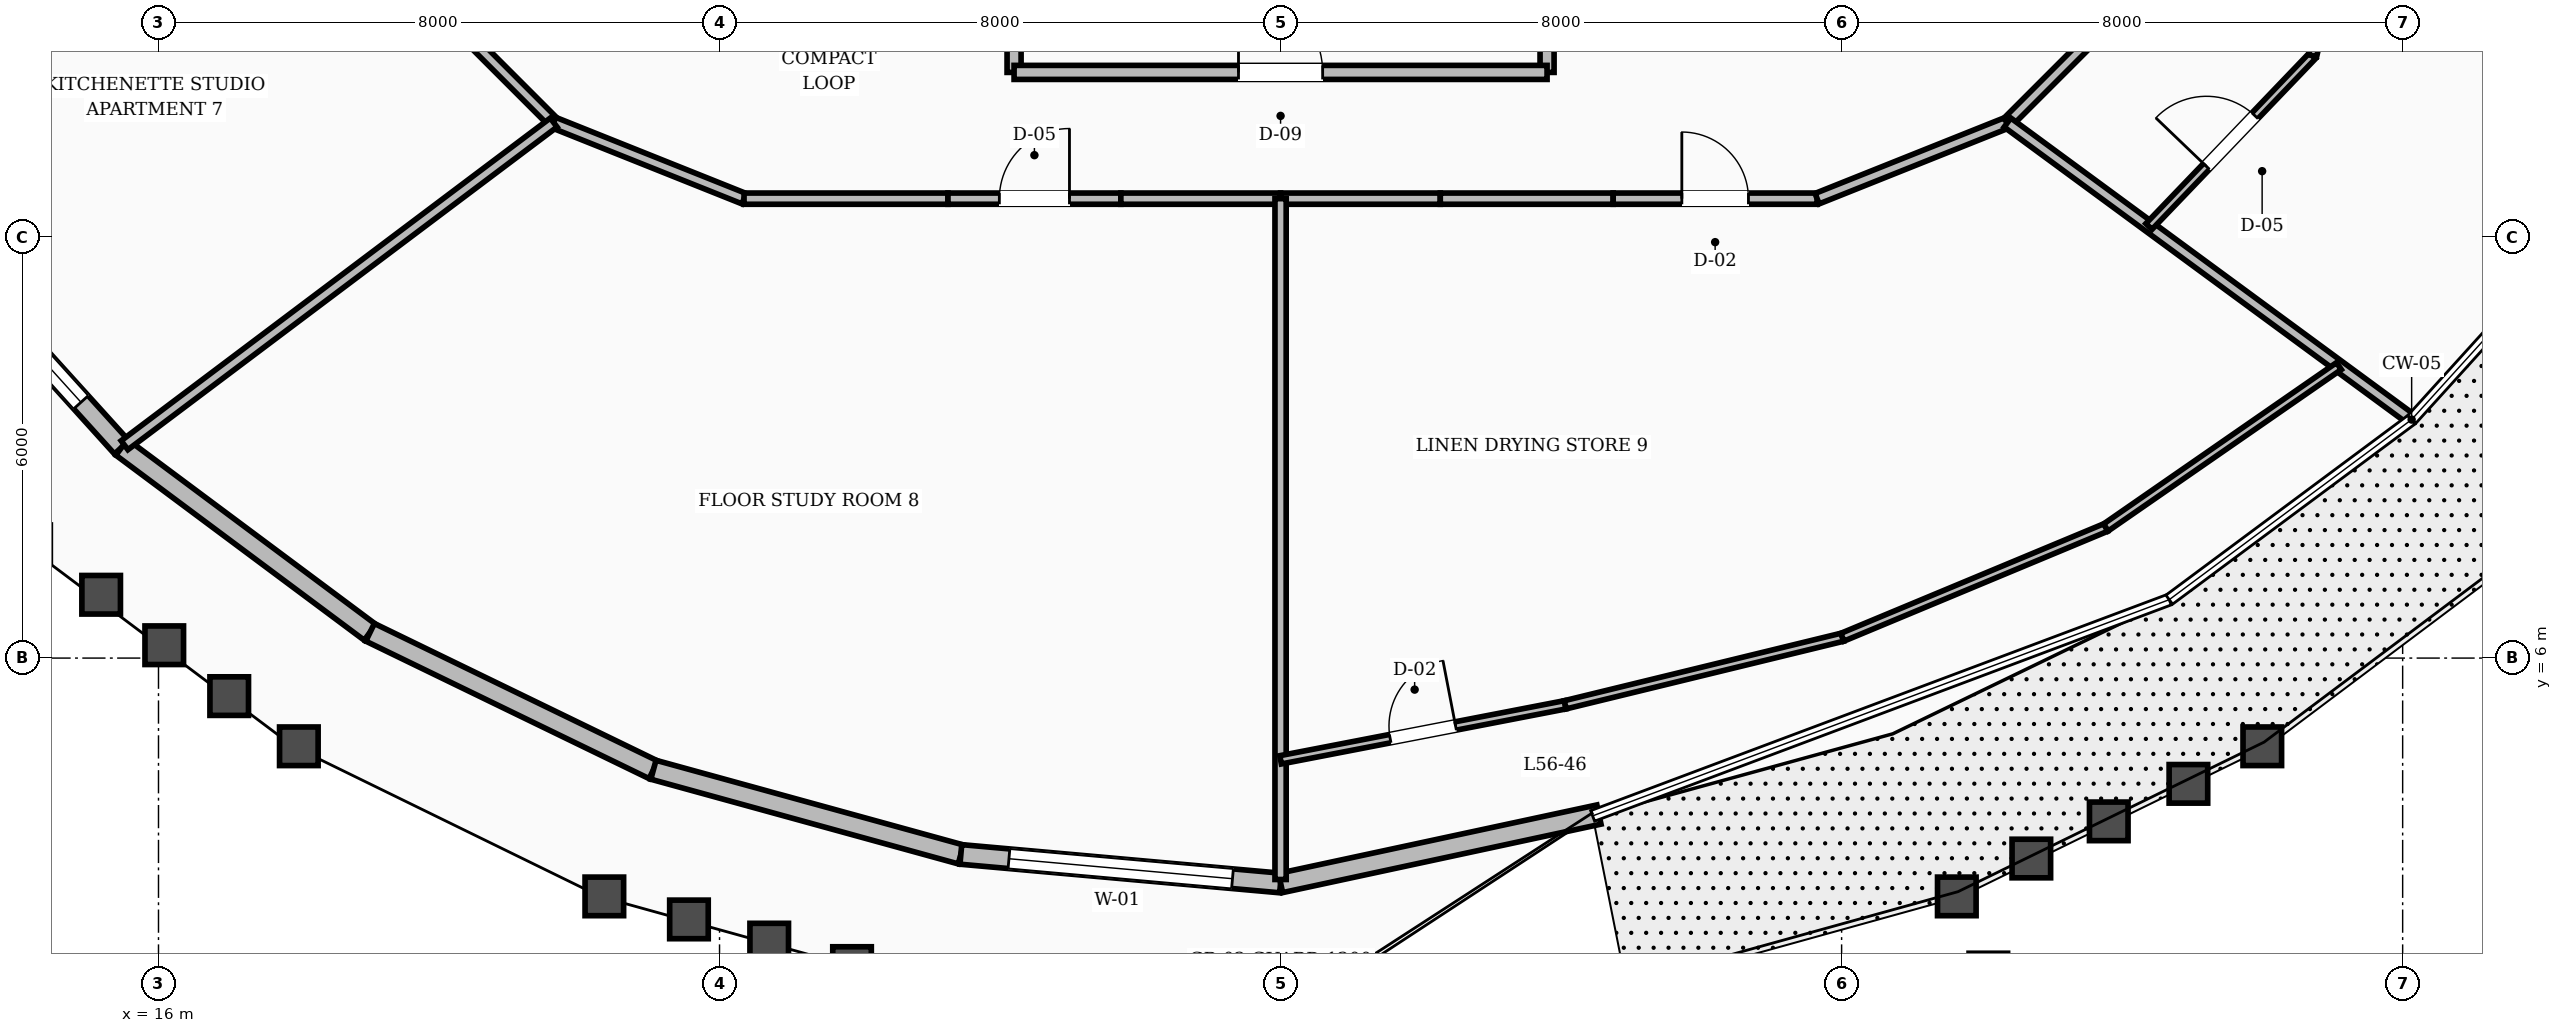
"""IFC4 building model, lengths in metres.
Left out: names, types, materials, properties, quantities, classifications, styles, units other than length and angle.
Written with IfcOpenShell. Run it as: python <this file> out.ifc"""

import sys

from ifc_helpers import new_model, si_unit, direction, frame, frame_2d, origin, place, context, subcontext, project, spatial, rectangle, extrude, element, fill, save


model = new_model("IFC4")
c1 = context("Model", 3, precision=1e-05, world=origin(), true_north=direction((0.0, 1.0)))
c2 = subcontext(c1, "Body", "Model", "MODEL_VIEW")
j1 = project(units=[si_unit("LENGTHUNIT", "METRE"), si_unit("PLANEANGLEUNIT", "RADIAN")], contexts=[c1])
p1 = place(None, origin())
s1 = spatial("IfcSite", under=j1, at=p1, CompositionType="ELEMENT")
p2 = place(p1, origin())
s2 = spatial("IfcBuilding", under=s1, at=p2, CompositionType="ELEMENT")
p3 = place(p2, frame((0.0, 0.0, 218.4)))
s3 = spatial("IfcBuildingStorey", under=s2, at=p3, CompositionType="ELEMENT", Elevation=218.4)
p4 = place(p3, frame((12.57, 12.218, 0.0), z_axis=(0.0, 0.0, 1.0), x_axis=(0.670746586543, -0.741686602711, 0.0)))
e1 = element("IfcWall", 1, at=p4, inside=s3, PredefinedType="STANDARD", context=c2, shape_type="SweptSolid", body=[
    extrude(rectangle(XDim=4.333, YDim=0.28, at=frame_2d((2.167, 0.0))), origin(), (0.0, 0.0, 1.0), 2.88),
])
p5 = place(p4, frame((0.866, 0.0, 0.8)))
e2 = element("IfcOpeningElement", 2, at=p5, cuts=e1, PredefinedType="OPENING", context=c2, shape_type="SweptSolid", body=[
    extrude(rectangle(XDim=2.6, YDim=1.65, at=frame_2d((1.3, 0.825))), frame((0.0, 0.15, 0.0), z_axis=(0.0, -1.0, 0.0), x_axis=(1.0, 0.0, 0.0)), (0.0, 0.0, 1.0), 0.3),
])
p6 = place(p3, frame((15.476, 9.005, 0.0), z_axis=(0.0, 0.0, 1.0), x_axis=(0.802005914902, -0.597316090912, 0.0)))
e3 = element("IfcWall", 3, at=p6, inside=s3, PredefinedType="STANDARD", context=c2, shape_type="SweptSolid", body=[
    extrude(rectangle(XDim=4.416, YDim=0.28, at=frame_2d((2.208, 0.0))), origin(), (0.0, 0.0, 1.0), 2.88),
])
p7 = place(p3, frame((19.017, 6.367, 0.0), z_axis=(0.0, 0.0, 1.0), x_axis=(0.899755886265, -0.436393566785, 0.0)))
e4 = element("IfcWall", 4, at=p7, inside=s3, PredefinedType="STANDARD", context=c2, shape_type="SweptSolid", body=[
    extrude(rectangle(XDim=4.49, YDim=0.28, at=frame_2d((2.245, 0.0))), origin(), (0.0, 0.0, 1.0), 2.88),
])
p8 = place(p3, frame((23.057, 4.408, 0.0), z_axis=(0.0, 0.0, 1.0), x_axis=(0.964121606476, -0.265460972511, 0.0)))
e5 = element("IfcWall", 5, at=p8, inside=s3, PredefinedType="STANDARD", context=c2, shape_type="SweptSolid", body=[
    extrude(rectangle(XDim=4.547, YDim=0.28, at=frame_2d((2.273, 0.0))), origin(), (0.0, 0.0, 1.0), 2.88),
])
p9 = place(p3, frame((27.441, 3.201, 0.0), z_axis=(0.0, 0.0, 1.0), x_axis=(0.996029770712, -0.089020760807, 0.0)))
e6 = element("IfcWall", 6, at=p9, inside=s3, PredefinedType="STANDARD", context=c2, shape_type="SweptSolid", body=[
    extrude(rectangle(XDim=4.577, YDim=0.28, at=frame_2d((2.289, 0.0))), origin(), (0.0, 0.0, 1.0), 2.88),
])
p10 = place(p9, frame((0.689, 0.0, 0.8)))
e7 = element("IfcOpeningElement", 7, at=p10, cuts=e6, PredefinedType="OPENING", context=c2, shape_type="SweptSolid", body=[
    extrude(rectangle(XDim=3.2, YDim=1.65, at=frame_2d((1.6, 0.825))), frame((0.0, 0.15, 0.0), z_axis=(0.0, -1.0, 0.0), x_axis=(1.0, 0.0, 0.0)), (0.0, 0.0, 1.0), 0.3),
])
p11 = place(p3, frame((32.0, 2.793, 0.0), z_axis=(0.0, 0.0, 1.0), x_axis=(0.977658303717, 0.21020047853, 0.0)))
e8 = element("IfcWall", 8, at=p11, inside=s3, PredefinedType="STANDARD", context=c2, shape_type="SweptSolid", body=[
    extrude(rectangle(XDim=4.644, YDim=0.28, at=frame_2d((2.322, 0.0))), origin(), (0.0, 0.0, 1.0), 2.88),
])
for number, where, z_axis, x_axis in (
    (9, (28.2, 14.35, 0.0), (0.0, 0.0, 1.0), (0.0, 1.0, 0.0)),
    (10, (35.8, 14.35, 0.0), (0.0, 0.0, 1.0), (0.0, 1.0, 0.0)),
):
    element("IfcWall", number, at=place(p3, frame(where, z_axis=z_axis, x_axis=x_axis)), inside=s3, PredefinedType="SOLIDWALL", context=c2, shape_type="SweptSolid", body=[
        extrude(rectangle(XDim=2.2, YDim=0.2, at=frame_2d((1.1, 0.0))), origin(), (0.0, 0.0, 1.0), 2.87),
    ])
p12 = place(p3, frame((28.2, 14.35, 0.0), z_axis=(0.0, 0.0, 1.0), x_axis=(1.0, 0.0, 0.0)))
e11 = element("IfcWall", 11, at=p12, inside=s3, PredefinedType="SOLIDWALL", context=c2, shape_type="SweptSolid", body=[
    extrude(rectangle(XDim=7.6, YDim=0.2, at=frame_2d((3.8, 0.0))), origin(), (0.0, 0.0, 1.0), 2.87),
])
p13 = place(p12, frame((3.2, 0.0, 0.0)))
e12 = element("IfcOpeningElement", 12, at=p13, cuts=e11, PredefinedType="OPENING", context=c2, shape_type="SweptSolid", body=[
    extrude(rectangle(XDim=1.2, YDim=2.1, at=frame_2d((0.6, 1.05))), frame((0.0, 0.11, 0.0), z_axis=(0.0, -1.0, 0.0), x_axis=(1.0, 0.0, 0.0)), (0.0, 0.0, 1.0), 0.22),
])
p14 = place(p3, frame((19.573, 15.697, 0.0), z_axis=(0.0, 0.0, 1.0), x_axis=(0.707106781187, -0.707106781187, 0.0)))
e13 = element("IfcWall", 13, at=p14, inside=s3, PredefinedType="SOLIDWALL", context=c2, shape_type="SweptSolid", body=[
    extrude(rectangle(XDim=2.916, YDim=0.16, at=frame_2d((1.458, 0.0))), origin(), (0.0, 0.0, 1.0), 2.87),
])
p15 = place(p3, frame((21.635, 13.635, 0.0), z_axis=(0.0, 0.0, 1.0), x_axis=(0.92856882165, -0.371160266542, 0.0)))
e14 = element("IfcWall", 14, at=p15, inside=s3, PredefinedType="SOLIDWALL", context=c2, shape_type="SweptSolid", body=[
    extrude(rectangle(XDim=2.923, YDim=0.16, at=frame_2d((1.461, 0.0))), origin(), (0.0, 0.0, 1.0), 2.87),
])
p16 = place(p3, frame((24.349, 12.55, 0.0), z_axis=(0.0, 0.0, 1.0), x_axis=(1.0, 0.0, 0.0)))
e15 = element("IfcWall", 15, at=p16, inside=s3, PredefinedType="SOLIDWALL", context=c2, shape_type="SweptSolid", body=[
    extrude(rectangle(XDim=2.908, YDim=0.16, at=frame_2d((1.454, 0.0))), origin(), (0.0, 0.0, 1.0), 2.87),
])
p17 = place(p3, frame((27.257, 12.55, 0.0), z_axis=(0.0, 0.0, 1.0), x_axis=(1.0, 0.0, 0.0)))
e16 = element("IfcWall", 16, at=p17, inside=s3, PredefinedType="SOLIDWALL", context=c2, shape_type="SweptSolid", body=[
    extrude(rectangle(XDim=2.465, YDim=0.16, at=frame_2d((1.232, 0.0))), origin(), (0.0, 0.0, 1.0), 2.87),
])
p18 = place(p17, frame((0.733, 0.0, 0.0)))
e17 = element("IfcOpeningElement", 17, at=p18, cuts=e16, PredefinedType="OPENING", context=c2, shape_type="SweptSolid", body=[
    extrude(rectangle(XDim=1.0, YDim=2.1, at=frame_2d((0.5, 1.05))), frame((0.0, 0.09, 0.0), z_axis=(0.0, -1.0, 0.0), x_axis=(1.0, 0.0, 0.0)), (0.0, 0.0, 1.0), 0.18),
])
for number, where, z_axis, x_axis in (
    (18, (29.722, 12.55, 0.0), (0.0, 0.0, 1.0), (1.0, 0.0, 0.0)),
    (19, (32.0, 12.55, 0.0), (0.0, 0.0, 1.0), (1.0, 0.0, 0.0)),
):
    element("IfcWall", number, at=place(p3, frame(where, z_axis=z_axis, x_axis=x_axis)), inside=s3, PredefinedType="SOLIDWALL", context=c2, shape_type="SweptSolid", body=[
        extrude(rectangle(XDim=2.278, YDim=0.16, at=frame_2d((1.139, 0.0))), origin(), (0.0, 0.0, 1.0), 2.87),
    ])
p19 = place(p3, frame((34.278, 12.55, 0.0), z_axis=(0.0, 0.0, 1.0), x_axis=(1.0, 0.0, 0.0)))
e20 = element("IfcWall", 20, at=p19, inside=s3, PredefinedType="SOLIDWALL", context=c2, shape_type="SweptSolid", body=[
    extrude(rectangle(XDim=2.465, YDim=0.16, at=frame_2d((1.232, 0.0))), origin(), (0.0, 0.0, 1.0), 2.87),
])
p20 = place(p3, frame((36.743, 12.55, 0.0), z_axis=(0.0, 0.0, 1.0), x_axis=(1.0, 0.0, 0.0)))
e21 = element("IfcWall", 21, at=p20, inside=s3, PredefinedType="SOLIDWALL", context=c2, shape_type="SweptSolid", body=[
    extrude(rectangle(XDim=2.908, YDim=0.16, at=frame_2d((1.454, 0.0))), origin(), (0.0, 0.0, 1.0), 2.87),
])
p21 = place(p20, frame((0.979, 0.0, 0.0)))
e22 = element("IfcOpeningElement", 22, at=p21, cuts=e21, PredefinedType="OPENING", context=c2, shape_type="SweptSolid", body=[
    extrude(rectangle(XDim=0.95, YDim=2.1, at=frame_2d((0.475, 1.05))), frame((0.0, 0.09, 0.0), z_axis=(0.0, -1.0, 0.0), x_axis=(1.0, 0.0, 0.0)), (0.0, 0.0, 1.0), 0.18),
])
p22 = place(p3, frame((39.651, 12.55, 0.0), z_axis=(0.0, 0.0, 1.0), x_axis=(0.92856882165, 0.371160266542, 0.0)))
e23 = element("IfcWall", 23, at=p22, inside=s3, PredefinedType="SOLIDWALL", context=c2, shape_type="SweptSolid", body=[
    extrude(rectangle(XDim=2.923, YDim=0.16, at=frame_2d((1.461, 0.0))), origin(), (0.0, 0.0, 1.0), 2.87),
])
p23 = place(p3, frame((42.365, 13.635, 0.0), z_axis=(0.0, 0.0, 1.0), x_axis=(0.707106781187, 0.707106781187, 0.0)))
e24 = element("IfcWall", 24, at=p23, inside=s3, PredefinedType="SOLIDWALL", context=c2, shape_type="SweptSolid", body=[
    extrude(rectangle(XDim=2.916, YDim=0.16, at=frame_2d((1.458, 0.0))), origin(), (0.0, 0.0, 1.0), 2.87),
])
p24 = place(p3, frame((42.365, 13.635, 0.0), z_axis=(0.0, 0.0, 1.0), x_axis=(0.805864739579, -0.592099671933, 0.0)))
e25 = element("IfcWall", 25, at=p24, inside=s3, PredefinedType="SOLIDWALL", context=c2, shape_type="SweptSolid", body=[
    extrude(rectangle(XDim=7.102, YDim=0.16, at=frame_2d((3.551, 0.0))), origin(), (0.0, 0.0, 1.0), 2.87),
])
p25 = place(p3, frame((44.382, 12.153, 0.0), z_axis=(0.0, 0.0, 1.0), x_axis=(0.691814158677, 0.722075598435, 0.0)))
e26 = element("IfcWall", 26, at=p25, inside=s3, PredefinedType="PARTITIONING", context=c2, shape_type="SweptSolid", body=[
    extrude(rectangle(XDim=3.372, YDim=0.12, at=frame_2d((1.686, 0.0))), origin(), (0.0, 0.0, 1.0), 2.87),
])
p26 = place(p25, frame((1.186, 0.0, 0.0)))
e27 = element("IfcOpeningElement", 27, at=p26, cuts=e26, PredefinedType="OPENING", context=c2, shape_type="SweptSolid", body=[
    extrude(rectangle(XDim=1.0, YDim=2.1, at=frame_2d((0.5, 1.05))), frame((0.0, 0.07, 0.0), z_axis=(0.0, -1.0, 0.0), x_axis=(1.0, 0.0, 0.0)), (0.0, 0.0, 1.0), 0.14),
])
p27 = place(p3, frame((46.715, 14.588, 0.0), z_axis=(0.0, 0.0, 1.0), x_axis=(0.228745067829, 0.97348636043, 0.0)))
e28 = element("IfcWall", 28, at=p27, inside=s3, PredefinedType="PARTITIONING", context=c2, shape_type="SweptSolid", body=[
    extrude(rectangle(XDim=3.376, YDim=0.12, at=frame_2d((1.688, 0.0))), origin(), (0.0, 0.0, 1.0), 2.87),
])
p28 = place(p3, frame((21.635, 13.635, 0.0), z_axis=(0.0, 0.0, 1.0), x_axis=(-0.799310631822, -0.600918059186, 0.0)))
e29 = element("IfcWall", 29, at=p28, inside=s3, PredefinedType="SOLIDWALL", context=c2, shape_type="SweptSolid", body=[
    extrude(rectangle(XDim=7.656, YDim=0.16, at=frame_2d((3.828, 0.0))), origin(), (0.0, 0.0, 1.0), 2.87),
])
p29 = place(p3, frame((32.0, 12.55, 0.0), z_axis=(0.0, 0.0, 1.0), x_axis=(0.0, -1.0, 0.0)))
e30 = element("IfcWall", 30, at=p29, inside=s3, PredefinedType="SOLIDWALL", context=c2, shape_type="SweptSolid", body=[
    extrude(rectangle(XDim=9.707, YDim=0.16, at=frame_2d((4.854, 0.0))), origin(), (0.0, 0.0, 1.0), 2.87),
])
p30 = place(p3, frame((32.0, 4.55, 0.0), z_axis=(0.0, 0.0, 1.0), x_axis=(0.981832058993, 0.189751964243, 0.0)))
e31 = element("IfcWall", 31, at=p30, inside=s3, PredefinedType="PARTITIONING", context=c2, shape_type="SweptSolid", body=[
    extrude(rectangle(XDim=4.134, YDim=0.12, at=frame_2d((2.067, 0.0))), origin(), (0.0, 0.0, 1.0), 2.87),
])
p31 = place(p30, frame((1.592, 0.0, 0.0)))
e32 = element("IfcOpeningElement", 32, at=p31, cuts=e31, PredefinedType="OPENING", context=c2, shape_type="SweptSolid", body=[
    extrude(rectangle(XDim=0.95, YDim=2.1, at=frame_2d((0.475, 1.05))), frame((0.0, 0.07, 0.0), z_axis=(0.0, -1.0, 0.0), x_axis=(1.0, 0.0, 0.0)), (0.0, 0.0, 1.0), 0.14),
])
p32 = place(p3, frame((36.059, 5.334, 0.0), z_axis=(0.0, 0.0, 1.0), x_axis=(0.971552006573, 0.236826304543, 0.0)))
e33 = element("IfcWall", 33, at=p32, inside=s3, PredefinedType="PARTITIONING", context=c2, shape_type="SweptSolid", body=[
    extrude(rectangle(XDim=4.068, YDim=0.12, at=frame_2d((2.034, 0.0))), origin(), (0.0, 0.0, 1.0), 2.87),
])
p33 = place(p3, frame((40.011, 6.297, 0.0), z_axis=(0.0, 0.0, 1.0), x_axis=(0.923142576053, 0.384457779578, 0.0)))
e34 = element("IfcWall", 34, at=p33, inside=s3, PredefinedType="PARTITIONING", context=c2, shape_type="SweptSolid", body=[
    extrude(rectangle(XDim=4.07, YDim=0.12, at=frame_2d((2.035, 0.0))), origin(), (0.0, 0.0, 1.0), 2.87),
])
p34 = place(p3, frame((43.768, 7.862, 0.0), z_axis=(0.0, 0.0, 1.0), x_axis=(0.8221443461, 0.569279082854, 0.0)))
e35 = element("IfcWall", 35, at=p34, inside=s3, PredefinedType="PARTITIONING", context=c2, shape_type="SweptSolid", body=[
    extrude(rectangle(XDim=4.042, YDim=0.12, at=frame_2d((2.021, 0.0))), origin(), (0.0, 0.0, 1.0), 2.87),
])
p35 = place(p5, origin())
e36 = element("IfcWindow", 36, at=p35, inside=s3, PartitioningType="SINGLE_PANEL", PredefinedType="WINDOW", context=c2, shape_type="SweptSolid", body=[
    extrude(rectangle(XDim=2.6, YDim=1.65, at=frame_2d((1.3, 0.825))), frame((0.0, 0.03, 0.0), z_axis=(0.0, -1.0, 0.0), x_axis=(1.0, 0.0, 0.0)), (0.0, 0.0, 1.0), 0.06),
])
fill(e2, e36)
p36 = place(p10, origin())
e37 = element("IfcWindow", 37, at=p36, inside=s3, PartitioningType="SINGLE_PANEL", PredefinedType="WINDOW", context=c2, shape_type="SweptSolid", body=[
    extrude(rectangle(XDim=3.2, YDim=1.65, at=frame_2d((1.6, 0.825))), frame((0.0, 0.03, 0.0), z_axis=(0.0, -1.0, 0.0), x_axis=(1.0, 0.0, 0.0)), (0.0, 0.0, 1.0), 0.06),
])
fill(e7, e37)
p37 = place(p13, origin())
e38 = element("IfcDoor", 38, at=p37, inside=s3, OperationType="SINGLE_SWING_LEFT", PredefinedType="DOOR", context=c2, shape_type="SweptSolid", body=[
    extrude(rectangle(XDim=1.2, YDim=2.1, at=frame_2d((0.6, 1.05))), frame((0.0, 0.025, 0.0), z_axis=(0.0, -1.0, 0.0), x_axis=(1.0, 0.0, 0.0)), (0.0, 0.0, 1.0), 0.05),
])
fill(e12, e38)
p38 = place(p26, origin())
e39 = element("IfcDoor", 39, at=p38, inside=s3, OperationType="SINGLE_SWING_LEFT", PredefinedType="DOOR", context=c2, shape_type="SweptSolid", body=[
    extrude(rectangle(XDim=1.0, YDim=2.1, at=frame_2d((0.5, 1.05))), frame((0.0, 0.025, 0.0), z_axis=(0.0, -1.0, 0.0), x_axis=(1.0, 0.0, 0.0)), (0.0, 0.0, 1.0), 0.05),
])
fill(e27, e39)
p39 = place(p18, origin())
e40 = element("IfcDoor", 40, at=p39, inside=s3, OperationType="SINGLE_SWING_RIGHT", PredefinedType="DOOR", context=c2, shape_type="SweptSolid", body=[
    extrude(rectangle(XDim=1.0, YDim=2.1, at=frame_2d((0.5, 1.05))), frame((0.0, 0.025, 0.0), z_axis=(0.0, -1.0, 0.0), x_axis=(1.0, 0.0, 0.0)), (0.0, 0.0, 1.0), 0.05),
])
fill(e17, e40)
p40 = place(p21, origin())
e41 = element("IfcDoor", 41, at=p40, inside=s3, OperationType="SINGLE_SWING_LEFT", PredefinedType="DOOR", context=c2, shape_type="SweptSolid", body=[
    extrude(rectangle(XDim=0.95, YDim=2.1, at=frame_2d((0.475, 1.05))), frame((0.0, 0.025, 0.0), z_axis=(0.0, -1.0, 0.0), x_axis=(1.0, 0.0, 0.0)), (0.0, 0.0, 1.0), 0.05),
])
fill(e22, e41)
p41 = place(p31, origin())
e42 = element("IfcDoor", 42, at=p41, inside=s3, OperationType="SINGLE_SWING_RIGHT", PredefinedType="DOOR", context=c2, shape_type="SweptSolid", body=[
    extrude(rectangle(XDim=0.95, YDim=2.1, at=frame_2d((0.475, 1.05))), frame((0.0, 0.025, 0.0), z_axis=(0.0, -1.0, 0.0), x_axis=(1.0, 0.0, 0.0)), (0.0, 0.0, 1.0), 0.05),
])
fill(e32, e42)
save(model, sys.argv[1])
